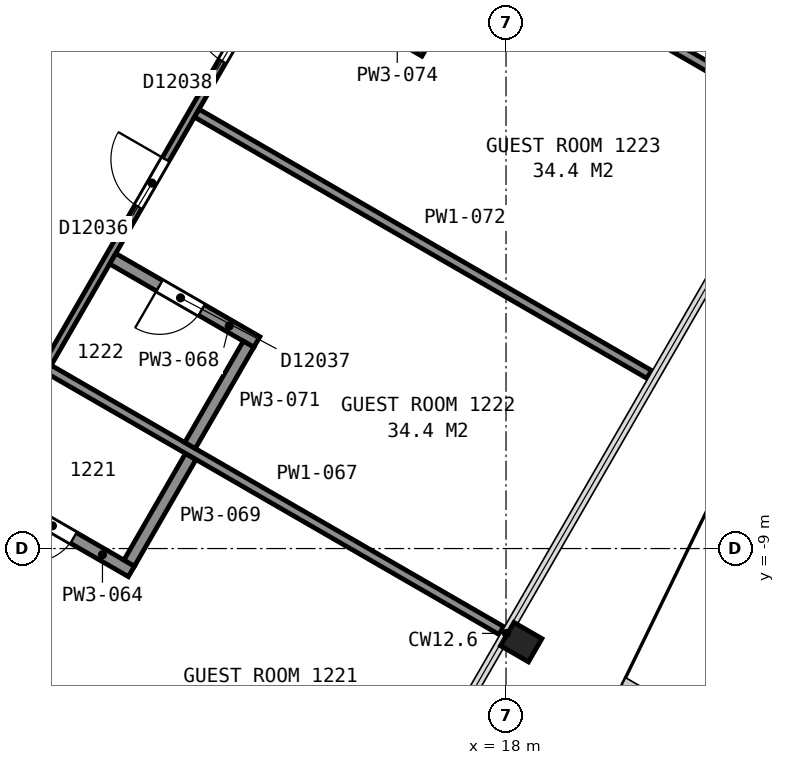
"""IFC4 building model, lengths in metres.
Left out: names, types, materials, properties, quantities, classifications, styles, units other than length and angle.
Written with IfcOpenShell. Run it as: python <this file> out.ifc"""

import sys

from ifc_helpers import new_model, si_unit, direction, frame, frame_2d, origin, origin_2d, place, context, subcontext, project, spatial, rectangle, i_section, extrude, element, fill, save


model = new_model("IFC4")
c1 = context("Model", 3, precision=1e-05, world=origin(), true_north=direction((0.0, 1.0)))
c2 = subcontext(c1, "Body", "Model", "MODEL_VIEW")
j1 = project(units=[si_unit("LENGTHUNIT", "METRE"), si_unit("PLANEANGLEUNIT", "RADIAN")], contexts=[c1])
p1 = place(None, origin())
s1 = spatial("IfcSite", under=j1, at=p1, CompositionType="ELEMENT")
p2 = place(p1, origin())
s2 = spatial("IfcBuilding", under=s1, at=p2, CompositionType="ELEMENT")
p3 = place(p2, frame((0.0, 0.0, 58.4)))
s3 = spatial("IfcBuildingStorey", under=s2, at=p3, CompositionType="ELEMENT", Elevation=58.4)
p4 = place(p3, frame((18.25, -10.54, 0.0), z_axis=(0.0, 0.0, 1.0), x_axis=(-0.5, -0.866025403784, 0.0)))
e1 = element("IfcColumn", 1, at=p4, inside=s3, PredefinedType="COLUMN", context=c2, shape_type="SweptSolid", body=[
    extrude(i_section(OverallWidth=0.442, OverallDepth=0.531, WebThickness=0.066, FlangeThickness=0.106, FilletRadius=0.015, at=origin_2d()), origin(), (0.0, 0.0, 1.0), 3.575),
])
p5 = place(p3, frame((8.492, -3.012, 0.0), z_axis=(0.0, 0.0, 1.0), x_axis=(0.499972957231, 0.866041016371, 0.0)))
e2 = element("IfcWall", 2, at=p5, inside=s3, PredefinedType="PARTITIONING", context=c2, shape_type="SweptSolid", body=[
    extrude(rectangle(XDim=10.349, YDim=0.2, at=frame_2d((5.174, 0.0))), origin(), (0.0, 0.0, 1.0), 3.35),
])
p6 = place(p3, frame((17.486, 6.206, 0.0), z_axis=(0.0, 0.0, 1.0), x_axis=(-0.499990458811, -0.866030912322, 0.0)))
e3 = element("IfcWall", 3, at=p6, inside=s3, PredefinedType="PARTITIONING", context=c2, shape_type="SweptSolid", body=[
    extrude(rectangle(XDim=27.441, YDim=0.125, at=frame_2d((13.721, 0.0))), origin(), (0.0, 0.0, 1.0), 2.613),
])
p7 = place(p6, frame((20.529, 0.0, 0.0)))
e4 = element("IfcOpeningElement", 4, at=p7, cuts=e3, PredefinedType="OPENING", context=c2, shape_type="SweptSolid", body=[
    extrude(rectangle(XDim=0.9, YDim=2.1, at=frame_2d((0.45, 1.05))), frame((0.0, 0.073, 0.0), z_axis=(0.0, -1.0, 0.0), x_axis=(1.0, 0.0, 0.0)), (0.0, 0.0, 1.0), 0.145),
])
p8 = place(p6, frame((17.516, 0.0, 0.0)))
e5 = element("IfcOpeningElement", 5, at=p8, cuts=e3, PredefinedType="OPENING", context=c2, shape_type="SweptSolid", body=[
    extrude(rectangle(XDim=0.9, YDim=2.1, at=frame_2d((0.45, 1.05))), frame((0.0, 0.073, 0.0), z_axis=(0.0, -1.0, 0.0), x_axis=(1.0, 0.0, 0.0)), (0.0, 0.0, 1.0), 0.145),
])
p9 = place(p6, frame((10.168, 0.0, 0.0)))
e6 = element("IfcOpeningElement", 6, at=p9, cuts=e3, PredefinedType="OPENING", context=c2, shape_type="SweptSolid", body=[
    extrude(rectangle(XDim=0.9, YDim=2.1, at=frame_2d((0.45, 1.05))), frame((0.0, 0.073, 0.0), z_axis=(0.0, -1.0, 0.0), x_axis=(1.0, 0.0, 0.0)), (0.0, 0.0, 1.0), 0.145),
])
p10 = place(p6, frame((7.403, 0.0, 0.0)))
e7 = element("IfcOpeningElement", 7, at=p10, cuts=e3, PredefinedType="OPENING", context=c2, shape_type="SweptSolid", body=[
    extrude(rectangle(XDim=0.9, YDim=2.1, at=frame_2d((0.45, 1.05))), frame((0.0, 0.073, 0.0), z_axis=(0.0, -1.0, 0.0), x_axis=(1.0, 0.0, 0.0)), (0.0, 0.0, 1.0), 0.145),
])
p11 = place(p6, frame((0.741, 0.0, 0.0)))
e8 = element("IfcOpeningElement", 8, at=p11, cuts=e3, PredefinedType="OPENING", context=c2, shape_type="SweptSolid", body=[
    extrude(rectangle(XDim=0.9, YDim=2.1, at=frame_2d((0.45, 1.05))), frame((0.0, 0.073, 0.0), z_axis=(0.0, -1.0, 0.0), x_axis=(1.0, 0.0, 0.0)), (0.0, 0.0, 1.0), 0.145),
])
p12 = place(p3, frame((7.733, -10.813, 0.0), z_axis=(0.0, 0.0, 1.0), x_axis=(0.866002910178, -0.500038958046, 0.0)))
e9 = element("IfcWall", 9, at=p12, inside=s3, PredefinedType="PARTITIONING", context=c2, shape_type="SweptSolid", body=[
    extrude(rectangle(XDim=8.591, YDim=0.15, at=frame_2d((4.295, 0.0))), origin(), (0.0, 0.0, 1.0), 2.613),
])
p13 = place(p3, frame((9.382, -7.957, 0.0), z_axis=(0.0, 0.0, 1.0), x_axis=(0.866048046904, -0.499960778915, 0.0)))
e10 = element("IfcWall", 10, at=p13, inside=s3, PredefinedType="PARTITIONING", context=c2, shape_type="SweptSolid", body=[
    extrude(rectangle(XDim=2.838, YDim=0.2, at=frame_2d((1.419, 0.0))), origin(), (0.0, 0.0, 1.0), 2.613),
])
p14 = place(p13, frame((0.938, 0.0, 0.0)))
e11 = element("IfcOpeningElement", 11, at=p14, cuts=e10, PredefinedType="OPENING", context=c2, shape_type="SweptSolid", body=[
    extrude(rectangle(XDim=0.8, YDim=2.1, at=frame_2d((0.4, 1.05))), frame((0.0, 0.11, 0.0), z_axis=(0.0, -1.0, 0.0), x_axis=(1.0, 0.0, 0.0)), (0.0, 0.0, 1.0), 0.22),
])
p15 = place(p3, frame((10.482, -6.051, 0.0), z_axis=(0.0, 0.0, 1.0), x_axis=(0.865978298045, -0.500081580659, 0.0)))
e12 = element("IfcWall", 12, at=p15, inside=s3, PredefinedType="PARTITIONING", context=c2, shape_type="SweptSolid", body=[
    extrude(rectangle(XDim=8.591, YDim=0.15, at=frame_2d((4.296, 0.0))), origin(), (0.0, 0.0, 1.0), 2.613),
])
p16 = place(p3, frame((13.903, -5.602, 0.0), z_axis=(0.0, 0.0, 1.0), x_axis=(-0.86596722502, 0.50010075504, 0.0)))
e13 = element("IfcWall", 13, at=p16, inside=s3, PredefinedType="PARTITIONING", context=c2, shape_type="SweptSolid", body=[
    extrude(rectangle(XDim=2.737, YDim=0.2, at=frame_2d((1.369, 0.0))), origin(), (0.0, 0.0, 1.0), 2.613),
])
p17 = place(p16, frame((1.05, 0.0, 0.0)))
e14 = element("IfcOpeningElement", 14, at=p17, cuts=e13, PredefinedType="OPENING", context=c2, shape_type="SweptSolid", body=[
    extrude(rectangle(XDim=0.8, YDim=2.1, at=frame_2d((0.4, 1.05))), frame((0.0, 0.11, 0.0), z_axis=(0.0, -1.0, 0.0), x_axis=(1.0, 0.0, 0.0)), (0.0, 0.0, 1.0), 0.22),
])
p18 = place(p3, frame((11.803, -9.24, 0.0), z_axis=(0.0, 0.0, 1.0), x_axis=(0.499816582577, 0.866131273989, 0.0)))
e15 = element("IfcWall", 15, at=p18, inside=s3, PredefinedType="PARTITIONING", context=c2, shape_type="SweptSolid", body=[
    extrude(rectangle(XDim=2.021, YDim=0.2, at=frame_2d((1.01, 0.0))), origin(), (0.0, 0.0, 1.0), 2.613),
])
p19 = place(p3, frame((12.803, -7.305, 0.0), z_axis=(0.0, 0.0, 1.0), x_axis=(0.500150762069, 0.865938343765, 0.0)))
e16 = element("IfcWall", 16, at=p19, inside=s3, PredefinedType="PARTITIONING", context=c2, shape_type="SweptSolid", body=[
    extrude(rectangle(XDim=1.924, YDim=0.2, at=frame_2d((0.962, 0.0))), origin(), (0.0, 0.0, 1.0), 2.613),
])
p20 = place(p3, frame((12.914, -1.839, 0.0), z_axis=(0.0, 0.0, 1.0), x_axis=(0.866010015463, -0.500026652407, 0.0)))
e17 = element("IfcWall", 17, at=p20, inside=s3, PredefinedType="PARTITIONING", context=c2, shape_type="SweptSolid", body=[
    extrude(rectangle(XDim=8.591, YDim=0.15, at=frame_2d((4.296, 0.0))), origin(), (0.0, 0.0, 1.0), 2.613),
])
p21 = place(p3, frame((14.295, 0.554, 0.0), z_axis=(0.0, 0.0, 1.0), x_axis=(0.866095017657, -0.499879405846, 0.0)))
e18 = element("IfcWall", 18, at=p21, inside=s3, PredefinedType="PARTITIONING", context=c2, shape_type="SweptSolid", body=[
    extrude(rectangle(XDim=2.738, YDim=0.2, at=frame_2d((1.369, 0.0))), origin(), (0.0, 0.0, 1.0), 2.613),
])
p22 = place(p21, frame((0.887, 0.0, 0.0)))
e19 = element("IfcOpeningElement", 19, at=p22, cuts=e18, PredefinedType="OPENING", context=c2, shape_type="SweptSolid", body=[
    extrude(rectangle(XDim=0.8, YDim=2.1, at=frame_2d((0.4, 1.05))), frame((0.0, 0.11, 0.0), z_axis=(0.0, -1.0, 0.0), x_axis=(1.0, 0.0, 0.0)), (0.0, 0.0, 1.0), 0.22),
])
p23 = place(p3, frame((15.349, 2.37, 0.0), z_axis=(0.0, 0.0, 1.0), x_axis=(0.866033609522, -0.499985786976, 0.0)))
e20 = element("IfcWall", 20, at=p23, inside=s3, PredefinedType="PARTITIONING", context=c2, shape_type="SweptSolid", body=[
    extrude(rectangle(XDim=8.587, YDim=0.15, at=frame_2d((4.293, 0.0))), origin(), (0.0, 0.0, 1.0), 2.613),
])
p24 = place(p9, origin())
e21 = element("IfcDoor", 21, at=p24, inside=s3, OperationType="SINGLE_SWING_LEFT", PredefinedType="DOOR", context=c2, shape_type="SweptSolid", body=[
    extrude(rectangle(XDim=0.9, YDim=2.1, at=frame_2d((0.45, 1.05))), frame((0.0, 0.025, 0.0), z_axis=(0.0, -1.0, 0.0), x_axis=(1.0, 0.0, 0.0)), (0.0, 0.0, 1.0), 0.05),
])
fill(e6, e21)
p25 = place(p10, origin())
e22 = element("IfcDoor", 22, at=p25, inside=s3, OperationType="SINGLE_SWING_LEFT", PredefinedType="DOOR", context=c2, shape_type="SweptSolid", body=[
    extrude(rectangle(XDim=0.9, YDim=2.1, at=frame_2d((0.45, 1.05))), frame((0.0, 0.025, 0.0), z_axis=(0.0, -1.0, 0.0), x_axis=(1.0, 0.0, 0.0)), (0.0, 0.0, 1.0), 0.05),
])
fill(e7, e22)
p26 = place(p14, origin())
e23 = element("IfcDoor", 23, at=p26, inside=s3, OperationType="SINGLE_SWING_LEFT", PredefinedType="DOOR", context=c2, shape_type="SweptSolid", body=[
    extrude(rectangle(XDim=0.8, YDim=2.1, at=frame_2d((0.4, 1.05))), frame((0.0, 0.025, 0.0), z_axis=(0.0, -1.0, 0.0), x_axis=(1.0, 0.0, 0.0)), (0.0, 0.0, 1.0), 0.05),
])
fill(e11, e23)
p27 = place(p17, origin())
e24 = element("IfcDoor", 24, at=p27, inside=s3, OperationType="SINGLE_SWING_RIGHT", PredefinedType="DOOR", context=c2, shape_type="SweptSolid", body=[
    extrude(rectangle(XDim=0.8, YDim=2.1, at=frame_2d((0.4, 1.05))), frame((0.0, 0.025, 0.0), z_axis=(0.0, -1.0, 0.0), x_axis=(1.0, 0.0, 0.0)), (0.0, 0.0, 1.0), 0.05),
])
fill(e14, e24)
save(model, sys.argv[1])
